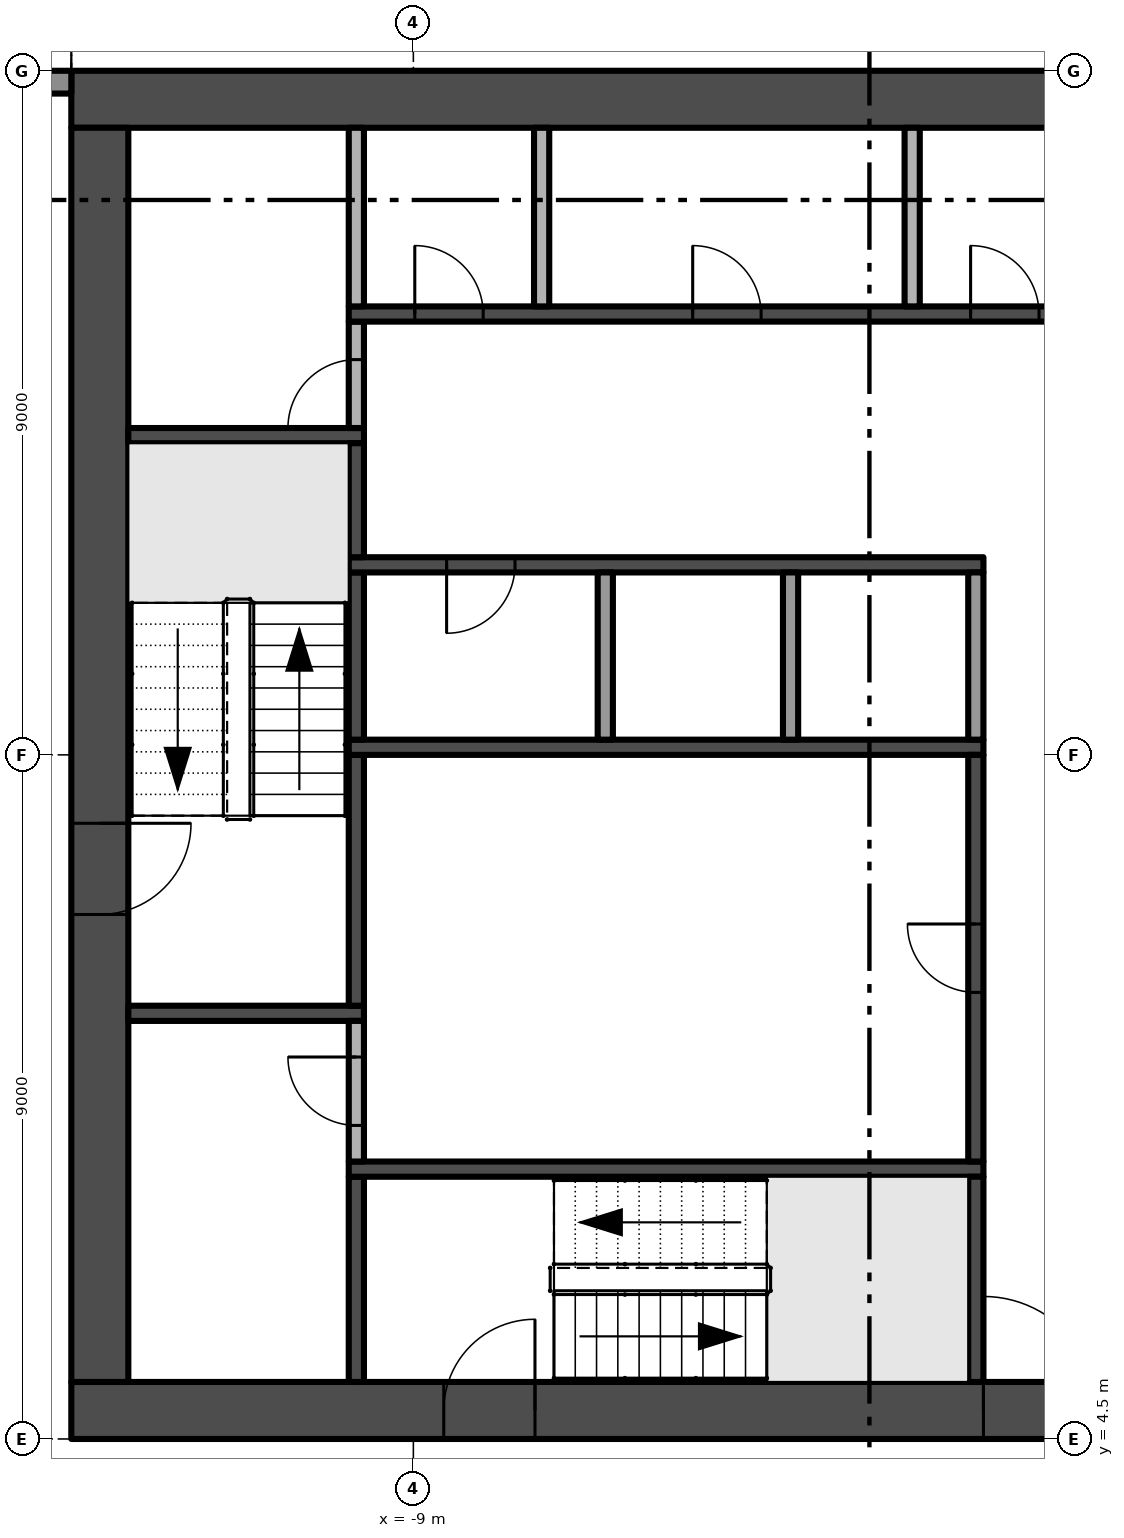
"""IFC4 building model, lengths in metres.
Left out: names, types, materials, properties, quantities, classifications, styles, units other than length and angle.
Written with IfcOpenShell. Run it as: python <this file> out.ifc"""

import sys

from ifc_helpers import new_model, si_unit, direction, frame, frame_2d, origin, place, context, subcontext, project, spatial, rectangle, extrude, element, fill, save


model = new_model("IFC4")
c1 = context("Model", 3, precision=1e-05, world=origin(), true_north=direction((0.0, 1.0)))
c2 = subcontext(c1, "Body", "Model", "MODEL_VIEW")
j1 = project(units=[si_unit("LENGTHUNIT", "METRE"), si_unit("PLANEANGLEUNIT", "RADIAN")], contexts=[c1])
p1 = place(None, origin())
s1 = spatial("IfcSite", under=j1, at=p1, CompositionType="ELEMENT")
p2 = place(p1, origin())
s2 = spatial("IfcBuilding", under=s1, at=p2, CompositionType="ELEMENT")
p3 = place(p2, frame((0.0, 0.0, 163.0)))
s3 = spatial("IfcBuildingStorey", under=s2, at=p3, CompositionType="ELEMENT", Elevation=163.0)
p4 = place(p3, frame((-13.5, 4.875, -0.3), z_axis=(0.0, 0.0, 1.0), x_axis=(1.0, 0.0, 0.0)))
e1 = element("IfcWall", 1, at=p4, inside=s3, PredefinedType="SHEAR", context=c2, shape_type="SweptSolid", body=[
    extrude(rectangle(XDim=27.0, YDim=0.75, at=frame_2d((13.5, 0.0))), origin(), (0.0, 0.0, 1.0), 3.8),
])
p5 = place(p4, frame((12.0, 0.0, 0.3)))
e2 = element("IfcOpeningElement", 2, at=p5, cuts=e1, PredefinedType="OPENING", context=c2, shape_type="SweptSolid", body=[
    extrude(rectangle(XDim=3.0, YDim=2.4, at=frame_2d((1.5, 1.2))), frame((0.0, 0.385, 0.0), z_axis=(0.0, -1.0, 0.0), x_axis=(1.0, 0.0, 0.0)), (0.0, 0.0, 1.0), 0.77),
])
p6 = place(p4, frame((4.9, 0.0, 0.3)))
e3 = element("IfcOpeningElement", 3, at=p6, cuts=e1, PredefinedType="OPENING", context=c2, shape_type="SweptSolid", body=[
    extrude(rectangle(XDim=1.2, YDim=2.2, at=frame_2d((0.6, 1.1))), frame((0.0, 0.385, 0.0), z_axis=(0.0, -1.0, 0.0), x_axis=(1.0, 0.0, 0.0)), (0.0, 0.0, 1.0), 0.77),
])
p7 = place(p4, frame((20.75, 0.0, 0.3)))
e4 = element("IfcOpeningElement", 4, at=p7, cuts=e1, PredefinedType="OPENING", context=c2, shape_type="SweptSolid", body=[
    extrude(rectangle(XDim=1.5, YDim=2.2, at=frame_2d((0.75, 1.1))), frame((0.0, 0.385, 0.0), z_axis=(0.0, -1.0, 0.0), x_axis=(1.0, 0.0, 0.0)), (0.0, 0.0, 1.0), 0.77),
])
p8 = place(p4, frame((17.4, 0.0, 0.3)))
e5 = element("IfcOpeningElement", 5, at=p8, cuts=e1, PredefinedType="OPENING", context=c2, shape_type="SweptSolid", body=[
    extrude(rectangle(XDim=1.2, YDim=2.2, at=frame_2d((0.6, 1.1))), frame((0.0, 0.385, 0.0), z_axis=(0.0, -1.0, 0.0), x_axis=(1.0, 0.0, 0.0)), (0.0, 0.0, 1.0), 0.77),
])
p9 = place(p3, frame((13.5, 22.125, -0.3), z_axis=(0.0, 0.0, 1.0), x_axis=(-1.0, 0.0, 0.0)))
e6 = element("IfcWall", 6, at=p9, inside=s3, PredefinedType="SHEAR", context=c2, shape_type="SweptSolid", body=[
    extrude(rectangle(XDim=27.0, YDim=0.75, at=frame_2d((13.5, 0.0))), origin(), (0.0, 0.0, 1.0), 3.8),
])
p10 = place(p3, frame((-13.125, 21.75, -0.3), z_axis=(0.0, 0.0, 1.0), x_axis=(0.0, -1.0, 0.0)))
e7 = element("IfcWall", 7, at=p10, inside=s3, PredefinedType="SHEAR", context=c2, shape_type="SweptSolid", body=[
    extrude(rectangle(XDim=16.5, YDim=0.75, at=frame_2d((8.25, 0.0))), origin(), (0.0, 0.0, 1.0), 3.8),
])
p11 = place(p10, frame((9.15, 0.0, 0.3)))
e8 = element("IfcOpeningElement", 8, at=p11, cuts=e7, PredefinedType="OPENING", context=c2, shape_type="SweptSolid", body=[
    extrude(rectangle(XDim=1.2, YDim=2.2, at=frame_2d((0.6, 1.1))), frame((0.0, 0.385, 0.0), z_axis=(0.0, -1.0, 0.0), x_axis=(1.0, 0.0, 0.0)), (0.0, 0.0, 1.0), 0.77),
])
p12 = place(p3, frame((-16.9, 22.35, 0.0), z_axis=(0.0, 0.0, 1.0), x_axis=(1.0, 0.0, 0.0)))
e9 = element("IfcWall", 9, at=p12, inside=s3, PredefinedType="SOLIDWALL", context=c2, shape_type="SweptSolid", body=[
    extrude(rectangle(XDim=3.4, YDim=0.3, at=frame_2d((1.7, 0.0))), origin(), (0.0, 0.0, 1.0), 3.5),
])
p13 = place(p12, frame((1.65, 0.0, 0.45)))
e10 = element("IfcOpeningElement", 10, at=p13, cuts=e9, PredefinedType="OPENING", context=c2, shape_type="SweptSolid", body=[
    extrude(rectangle(XDim=1.05, YDim=2.65, at=frame_2d((0.525, 1.325))), frame((0.0, 0.16, 0.0), z_axis=(0.0, -1.0, 0.0), x_axis=(1.0, 0.0, 0.0)), (0.0, 0.0, 1.0), 0.32),
])
p14 = place(p12, frame((0.3, 0.0, 0.0)))
e11 = element("IfcOpeningElement", 11, at=p14, cuts=e9, PredefinedType="OPENING", context=c2, shape_type="SweptSolid", body=[
    extrude(rectangle(XDim=1.2, YDim=2.4, at=frame_2d((0.6, 1.2))), frame((0.0, 0.16, 0.0), z_axis=(0.0, -1.0, 0.0), x_axis=(1.0, 0.0, 0.0)), (0.0, 0.0, 1.0), 0.32),
])
for number, where, z_axis, x_axis in (
    (12, (-12.75, 10.1, 0.0), (0.0, 0.0, 1.0), (1.0, 0.0, 0.0)),
    (13, (-12.75, 17.7, 0.0), (0.0, 0.0, 1.0), (1.0, 0.0, 0.0)),
):
    element("IfcWall", number, at=place(p3, frame(where, z_axis=z_axis, x_axis=x_axis)), inside=s3, PredefinedType="SHEAR", context=c2, shape_type="SweptSolid", body=[
        extrude(rectangle(XDim=3.1, YDim=0.2, at=frame_2d((1.55, 0.0))), origin(), (0.0, 0.0, 1.0), 3.5),
    ])
p15 = place(p3, frame((-9.75, 5.25, 0.0), z_axis=(0.0, 0.0, 1.0), x_axis=(0.0, 1.0, 0.0)))
e14 = element("IfcWall", 14, at=p15, inside=s3, PredefinedType="SHEAR", context=c2, shape_type="SweptSolid", body=[
    extrude(rectangle(XDim=2.7, YDim=0.2, at=frame_2d((1.35, 0.0))), origin(), (0.0, 0.0, 1.0), 3.5),
])
p16 = place(p3, frame((-9.85, 8.05, 0.0), z_axis=(0.0, 0.0, 1.0), x_axis=(1.0, 0.0, 0.0)))
e15 = element("IfcWall", 15, at=p16, inside=s3, PredefinedType="SHEAR", context=c2, shape_type="SweptSolid", body=[
    extrude(rectangle(XDim=8.35, YDim=0.2, at=frame_2d((4.175, 0.0))), origin(), (0.0, 0.0, 1.0), 3.5),
])
p17 = place(p3, frame((-9.75, 8.15, 0.0), z_axis=(0.0, 0.0, 1.0), x_axis=(0.0, 1.0, 0.0)))
e16 = element("IfcWall", 16, at=p17, inside=s3, PredefinedType="PARTITIONING", context=c2, shape_type="SweptSolid", body=[
    extrude(rectangle(XDim=1.85, YDim=0.2, at=frame_2d((0.925, 0.0))), origin(), (0.0, 0.0, 1.0), 3.5),
])
p18 = place(p17, frame((0.475, 0.0, 0.0)))
e17 = element("IfcOpeningElement", 17, at=p18, cuts=e16, PredefinedType="OPENING", context=c2, shape_type="SweptSolid", body=[
    extrude(rectangle(XDim=0.9, YDim=2.1, at=frame_2d((0.45, 1.05))), frame((0.0, 0.11, 0.0), z_axis=(0.0, -1.0, 0.0), x_axis=(1.0, 0.0, 0.0)), (0.0, 0.0, 1.0), 0.22),
])
p19 = place(p3, frame((-9.75, 10.2, 0.0), z_axis=(0.0, 0.0, 1.0), x_axis=(0.0, 1.0, 0.0)))
e18 = element("IfcWall", 18, at=p19, inside=s3, PredefinedType="SHEAR", context=c2, shape_type="SweptSolid", body=[
    extrude(rectangle(XDim=3.3, YDim=0.2, at=frame_2d((1.65, 0.0))), origin(), (0.0, 0.0, 1.0), 3.5),
])
p20 = place(p3, frame((-9.85, 13.6, 0.0), z_axis=(0.0, 0.0, 1.0), x_axis=(1.0, 0.0, 0.0)))
e19 = element("IfcWall", 19, at=p20, inside=s3, PredefinedType="SHEAR", context=c2, shape_type="SweptSolid", body=[
    extrude(rectangle(XDim=8.35, YDim=0.2, at=frame_2d((4.175, 0.0))), origin(), (0.0, 0.0, 1.0), 3.5),
])
p21 = place(p3, frame((-9.75, 13.7, 0.0), z_axis=(0.0, 0.0, 1.0), x_axis=(0.0, 1.0, 0.0)))
e20 = element("IfcWall", 20, at=p21, inside=s3, PredefinedType="SHEAR", context=c2, shape_type="SweptSolid", body=[
    extrude(rectangle(XDim=2.2, YDim=0.2, at=frame_2d((1.1, 0.0))), origin(), (0.0, 0.0, 1.0), 3.5),
])
p22 = place(p3, frame((-1.5, 16.0, 0.0), z_axis=(0.0, 0.0, 1.0), x_axis=(-1.0, 0.0, 0.0)))
e21 = element("IfcWall", 21, at=p22, inside=s3, PredefinedType="SHEAR", context=c2, shape_type="SweptSolid", body=[
    extrude(rectangle(XDim=8.35, YDim=0.2, at=frame_2d((4.175, 0.0))), origin(), (0.0, 0.0, 1.0), 3.5),
])
p23 = place(p22, frame((6.162, 0.0, 0.0)))
e22 = element("IfcOpeningElement", 22, at=p23, cuts=e21, PredefinedType="OPENING", context=c2, shape_type="SweptSolid", body=[
    extrude(rectangle(XDim=0.9, YDim=2.1, at=frame_2d((0.45, 1.05))), frame((0.0, 0.11, 0.0), z_axis=(0.0, -1.0, 0.0), x_axis=(1.0, 0.0, 0.0)), (0.0, 0.0, 1.0), 0.22),
])
p24 = place(p3, frame((-9.75, 16.1, 0.0), z_axis=(0.0, 0.0, 1.0), x_axis=(0.0, 1.0, 0.0)))
e23 = element("IfcWall", 23, at=p24, inside=s3, PredefinedType="SHEAR", context=c2, shape_type="SweptSolid", body=[
    extrude(rectangle(XDim=1.5, YDim=0.2, at=frame_2d((0.75, 0.0))), origin(), (0.0, 0.0, 1.0), 3.5),
])
p25 = place(p3, frame((-9.75, 17.8, 0.0), z_axis=(0.0, 0.0, 1.0), x_axis=(0.0, 1.0, 0.0)))
e24 = element("IfcWall", 24, at=p25, inside=s3, PredefinedType="PARTITIONING", context=c2, shape_type="SweptSolid", body=[
    extrude(rectangle(XDim=1.4, YDim=0.2, at=frame_2d((0.7, 0.0))), origin(), (0.0, 0.0, 1.0), 3.5),
])
p26 = place(p25, origin())
e25 = element("IfcOpeningElement", 25, at=p26, cuts=e24, PredefinedType="OPENING", context=c2, shape_type="SweptSolid", body=[
    extrude(rectangle(XDim=0.9, YDim=2.1, at=frame_2d((0.45, 1.05))), frame((0.0, 0.11, 0.0), z_axis=(0.0, -1.0, 0.0), x_axis=(1.0, 0.0, 0.0)), (0.0, 0.0, 1.0), 0.22),
])
p27 = place(p3, frame((-9.85, 19.3, 0.0), z_axis=(0.0, 0.0, 1.0), x_axis=(1.0, 0.0, 0.0)))
e26 = element("IfcWall", 26, at=p27, inside=s3, PredefinedType="SHEAR", context=c2, shape_type="SweptSolid", body=[
    extrude(rectangle(XDim=19.7, YDim=0.2, at=frame_2d((9.85, 0.0))), origin(), (0.0, 0.0, 1.0), 3.5),
])
p28 = place(p27, frame((10.519, 0.0, 0.0)))
e27 = element("IfcOpeningElement", 27, at=p28, cuts=e26, PredefinedType="OPENING", context=c2, shape_type="SweptSolid", body=[
    extrude(rectangle(XDim=1.1, YDim=2.1, at=frame_2d((0.55, 1.05))), frame((0.0, 0.11, 0.0), z_axis=(0.0, -1.0, 0.0), x_axis=(1.0, 0.0, 0.0)), (0.0, 0.0, 1.0), 0.22),
])
p29 = place(p27, frame((12.956, 0.0, 0.0)))
e28 = element("IfcOpeningElement", 28, at=p29, cuts=e26, PredefinedType="OPENING", context=c2, shape_type="SweptSolid", body=[
    extrude(rectangle(XDim=1.1, YDim=2.1, at=frame_2d((0.55, 1.05))), frame((0.0, 0.11, 0.0), z_axis=(0.0, -1.0, 0.0), x_axis=(1.0, 0.0, 0.0)), (0.0, 0.0, 1.0), 0.22),
])
p30 = place(p27, frame((15.394, 0.0, 0.0)))
e29 = element("IfcOpeningElement", 29, at=p30, cuts=e26, PredefinedType="OPENING", context=c2, shape_type="SweptSolid", body=[
    extrude(rectangle(XDim=1.1, YDim=2.1, at=frame_2d((0.55, 1.05))), frame((0.0, 0.11, 0.0), z_axis=(0.0, -1.0, 0.0), x_axis=(1.0, 0.0, 0.0)), (0.0, 0.0, 1.0), 0.22),
])
p31 = place(p27, frame((17.831, 0.0, 0.0)))
e30 = element("IfcOpeningElement", 30, at=p31, cuts=e26, PredefinedType="OPENING", context=c2, shape_type="SweptSolid", body=[
    extrude(rectangle(XDim=1.1, YDim=2.1, at=frame_2d((0.55, 1.05))), frame((0.0, 0.11, 0.0), z_axis=(0.0, -1.0, 0.0), x_axis=(1.0, 0.0, 0.0)), (0.0, 0.0, 1.0), 0.22),
])
p32 = place(p27, frame((0.869, 0.0, 0.0)))
e31 = element("IfcOpeningElement", 31, at=p32, cuts=e26, PredefinedType="OPENING", context=c2, shape_type="SweptSolid", body=[
    extrude(rectangle(XDim=0.9, YDim=2.1, at=frame_2d((0.45, 1.05))), frame((0.0, 0.11, 0.0), z_axis=(0.0, -1.0, 0.0), x_axis=(1.0, 0.0, 0.0)), (0.0, 0.0, 1.0), 0.22),
])
p33 = place(p27, frame((4.525, 0.0, 0.0)))
e32 = element("IfcOpeningElement", 32, at=p33, cuts=e26, PredefinedType="OPENING", context=c2, shape_type="SweptSolid", body=[
    extrude(rectangle(XDim=0.9, YDim=2.1, at=frame_2d((0.45, 1.05))), frame((0.0, 0.11, 0.0), z_axis=(0.0, -1.0, 0.0), x_axis=(1.0, 0.0, 0.0)), (0.0, 0.0, 1.0), 0.22),
])
p34 = place(p27, frame((8.181, 0.0, 0.0)))
e33 = element("IfcOpeningElement", 33, at=p34, cuts=e26, PredefinedType="OPENING", context=c2, shape_type="SweptSolid", body=[
    extrude(rectangle(XDim=0.9, YDim=2.1, at=frame_2d((0.45, 1.05))), frame((0.0, 0.11, 0.0), z_axis=(0.0, -1.0, 0.0), x_axis=(1.0, 0.0, 0.0)), (0.0, 0.0, 1.0), 0.22),
])
for number, where, z_axis, x_axis in (
    (34, (-9.75, 19.4, 0.0), (0.0, 0.0, 1.0), (0.0, 1.0, 0.0)),
    (35, (-7.312, 19.4, 0.0), (0.0, 0.0, 1.0), (0.0, 1.0, 0.0)),
):
    element("IfcWall", number, at=place(p3, frame(where, z_axis=z_axis, x_axis=x_axis)), inside=s3, PredefinedType="PARTITIONING", context=c2, shape_type="SweptSolid", body=[
        extrude(rectangle(XDim=2.35, YDim=0.2, at=frame_2d((1.175, 0.0))), origin(), (0.0, 0.0, 1.0), 3.5),
    ])
for number, where, z_axis, x_axis in (
    (36, (-6.475, 13.7, 0.0), (0.0, 0.0, 1.0), (0.0, 1.0, 0.0)),
    (37, (-4.037, 13.7, 0.0), (0.0, 0.0, 1.0), (0.0, 1.0, 0.0)),
):
    element("IfcWall", number, at=place(p3, frame(where, z_axis=z_axis, x_axis=x_axis)), inside=s3, PredefinedType="PARTITIONING", context=c2, shape_type="SweptSolid", body=[
        extrude(rectangle(XDim=2.2, YDim=0.2, at=frame_2d((1.1, 0.0))), origin(), (0.0, 0.0, 1.0), 3.5),
    ])
p35 = place(p3, frame((-2.438, 19.4, 0.0), z_axis=(0.0, 0.0, 1.0), x_axis=(0.0, 1.0, 0.0)))
e38 = element("IfcWall", 38, at=p35, inside=s3, PredefinedType="PARTITIONING", context=c2, shape_type="SweptSolid", body=[
    extrude(rectangle(XDim=2.35, YDim=0.2, at=frame_2d((1.175, 0.0))), origin(), (0.0, 0.0, 1.0), 3.5),
])
p36 = place(p3, frame((-1.6, 5.25, 0.0), z_axis=(0.0, 0.0, 1.0), x_axis=(0.0, 1.0, 0.0)))
e39 = element("IfcWall", 39, at=p36, inside=s3, PredefinedType="SHEAR", context=c2, shape_type="SweptSolid", body=[
    extrude(rectangle(XDim=2.7, YDim=0.2, at=frame_2d((1.35, 0.0))), origin(), (0.0, 0.0, 1.0), 3.5),
])
p37 = place(p3, frame((-1.6, 8.15, 0.0), z_axis=(0.0, 0.0, 1.0), x_axis=(0.0, 1.0, 0.0)))
e40 = element("IfcWall", 40, at=p37, inside=s3, PredefinedType="SHEAR", context=c2, shape_type="SweptSolid", body=[
    extrude(rectangle(XDim=5.35, YDim=0.2, at=frame_2d((2.675, 0.0))), origin(), (0.0, 0.0, 1.0), 3.5),
])
p38 = place(p37, frame((2.225, 0.0, 0.0)))
e41 = element("IfcOpeningElement", 41, at=p38, cuts=e40, PredefinedType="OPENING", context=c2, shape_type="SweptSolid", body=[
    extrude(rectangle(XDim=0.9, YDim=2.1, at=frame_2d((0.45, 1.05))), frame((0.0, 0.11, 0.0), z_axis=(0.0, -1.0, 0.0), x_axis=(1.0, 0.0, 0.0)), (0.0, 0.0, 1.0), 0.22),
])
p39 = place(p3, frame((-1.6, 13.7, 0.0), z_axis=(0.0, 0.0, 1.0), x_axis=(0.0, 1.0, 0.0)))
e42 = element("IfcWall", 42, at=p39, inside=s3, PredefinedType="PARTITIONING", context=c2, shape_type="SweptSolid", body=[
    extrude(rectangle(XDim=2.2, YDim=0.2, at=frame_2d((1.1, 0.0))), origin(), (0.0, 0.0, 1.0), 3.5),
])
p40 = place(p5, frame((3.0, 0.0, 0.0), z_axis=(0.0, 0.0, 1.0), x_axis=(-1.0, 0.0, 0.0)))
e43 = element("IfcDoor", 43, at=p40, inside=s3, OperationType="DOUBLE_DOOR_SINGLE_SWING", PredefinedType="DOOR", context=c2, shape_type="SweptSolid", body=[
    extrude(rectangle(XDim=3.0, YDim=2.4, at=frame_2d((1.5, 1.2))), frame((0.0, 0.025, 0.0), z_axis=(0.0, -1.0, 0.0), x_axis=(1.0, 0.0, 0.0)), (0.0, 0.0, 1.0), 0.05),
])
fill(e2, e43)
p41 = place(p11, frame((1.2, 0.0, 0.0), z_axis=(0.0, 0.0, 1.0), x_axis=(-1.0, 0.0, 0.0)))
e44 = element("IfcDoor", 44, at=p41, inside=s3, OperationType="SINGLE_SWING_RIGHT", PredefinedType="DOOR", context=c2, shape_type="SweptSolid", body=[
    extrude(rectangle(XDim=1.2, YDim=2.2, at=frame_2d((0.6, 1.1))), frame((0.0, 0.025, 0.0), z_axis=(0.0, -1.0, 0.0), x_axis=(1.0, 0.0, 0.0)), (0.0, 0.0, 1.0), 0.05),
])
fill(e8, e44)
p42 = place(p6, frame((1.2, 0.0, 0.0), z_axis=(0.0, 0.0, 1.0), x_axis=(-1.0, 0.0, 0.0)))
e45 = element("IfcDoor", 45, at=p42, inside=s3, OperationType="SINGLE_SWING_LEFT", PredefinedType="DOOR", context=c2, shape_type="SweptSolid", body=[
    extrude(rectangle(XDim=1.2, YDim=2.2, at=frame_2d((0.6, 1.1))), frame((0.0, 0.025, 0.0), z_axis=(0.0, -1.0, 0.0), x_axis=(1.0, 0.0, 0.0)), (0.0, 0.0, 1.0), 0.05),
])
fill(e3, e45)
p43 = place(p38, origin())
e46 = element("IfcDoor", 46, at=p43, inside=s3, OperationType="SINGLE_SWING_RIGHT", PredefinedType="DOOR", context=c2, shape_type="SweptSolid", body=[
    extrude(rectangle(XDim=0.9, YDim=2.1, at=frame_2d((0.45, 1.05))), frame((0.0, 0.025, 0.0), z_axis=(0.0, -1.0, 0.0), x_axis=(1.0, 0.0, 0.0)), (0.0, 0.0, 1.0), 0.05),
])
fill(e41, e46)
p44 = place(p23, origin())
e47 = element("IfcDoor", 47, at=p44, inside=s3, OperationType="SINGLE_SWING_RIGHT", PredefinedType="DOOR", context=c2, shape_type="SweptSolid", body=[
    extrude(rectangle(XDim=0.9, YDim=2.1, at=frame_2d((0.45, 1.05))), frame((0.0, 0.025, 0.0), z_axis=(0.0, -1.0, 0.0), x_axis=(1.0, 0.0, 0.0)), (0.0, 0.0, 1.0), 0.05),
])
fill(e22, e47)
p45 = place(p26, origin())
e48 = element("IfcDoor", 48, at=p45, inside=s3, OperationType="SINGLE_SWING_LEFT", PredefinedType="DOOR", context=c2, shape_type="SweptSolid", body=[
    extrude(rectangle(XDim=0.9, YDim=2.1, at=frame_2d((0.45, 1.05))), frame((0.0, 0.025, 0.0), z_axis=(0.0, -1.0, 0.0), x_axis=(1.0, 0.0, 0.0)), (0.0, 0.0, 1.0), 0.05),
])
fill(e25, e48)
p46 = place(p32, origin())
e49 = element("IfcDoor", 49, at=p46, inside=s3, OperationType="SINGLE_SWING_LEFT", PredefinedType="DOOR", context=c2, shape_type="SweptSolid", body=[
    extrude(rectangle(XDim=0.9, YDim=2.1, at=frame_2d((0.45, 1.05))), frame((0.0, 0.025, 0.0), z_axis=(0.0, -1.0, 0.0), x_axis=(1.0, 0.0, 0.0)), (0.0, 0.0, 1.0), 0.05),
])
fill(e31, e49)
p47 = place(p33, origin())
e50 = element("IfcDoor", 50, at=p47, inside=s3, OperationType="SINGLE_SWING_LEFT", PredefinedType="DOOR", context=c2, shape_type="SweptSolid", body=[
    extrude(rectangle(XDim=0.9, YDim=2.1, at=frame_2d((0.45, 1.05))), frame((0.0, 0.025, 0.0), z_axis=(0.0, -1.0, 0.0), x_axis=(1.0, 0.0, 0.0)), (0.0, 0.0, 1.0), 0.05),
])
fill(e32, e50)
p48 = place(p34, origin())
e51 = element("IfcDoor", 51, at=p48, inside=s3, OperationType="SINGLE_SWING_LEFT", PredefinedType="DOOR", context=c2, shape_type="SweptSolid", body=[
    extrude(rectangle(XDim=0.9, YDim=2.1, at=frame_2d((0.45, 1.05))), frame((0.0, 0.025, 0.0), z_axis=(0.0, -1.0, 0.0), x_axis=(1.0, 0.0, 0.0)), (0.0, 0.0, 1.0), 0.05),
])
fill(e33, e51)
p49 = place(p18, origin())
e52 = element("IfcDoor", 52, at=p49, inside=s3, OperationType="SINGLE_SWING_RIGHT", PredefinedType="DOOR", context=c2, shape_type="SweptSolid", body=[
    extrude(rectangle(XDim=0.9, YDim=2.1, at=frame_2d((0.45, 1.05))), frame((0.0, 0.025, 0.0), z_axis=(0.0, -1.0, 0.0), x_axis=(1.0, 0.0, 0.0)), (0.0, 0.0, 1.0), 0.05),
])
fill(e17, e52)
save(model, sys.argv[1])
